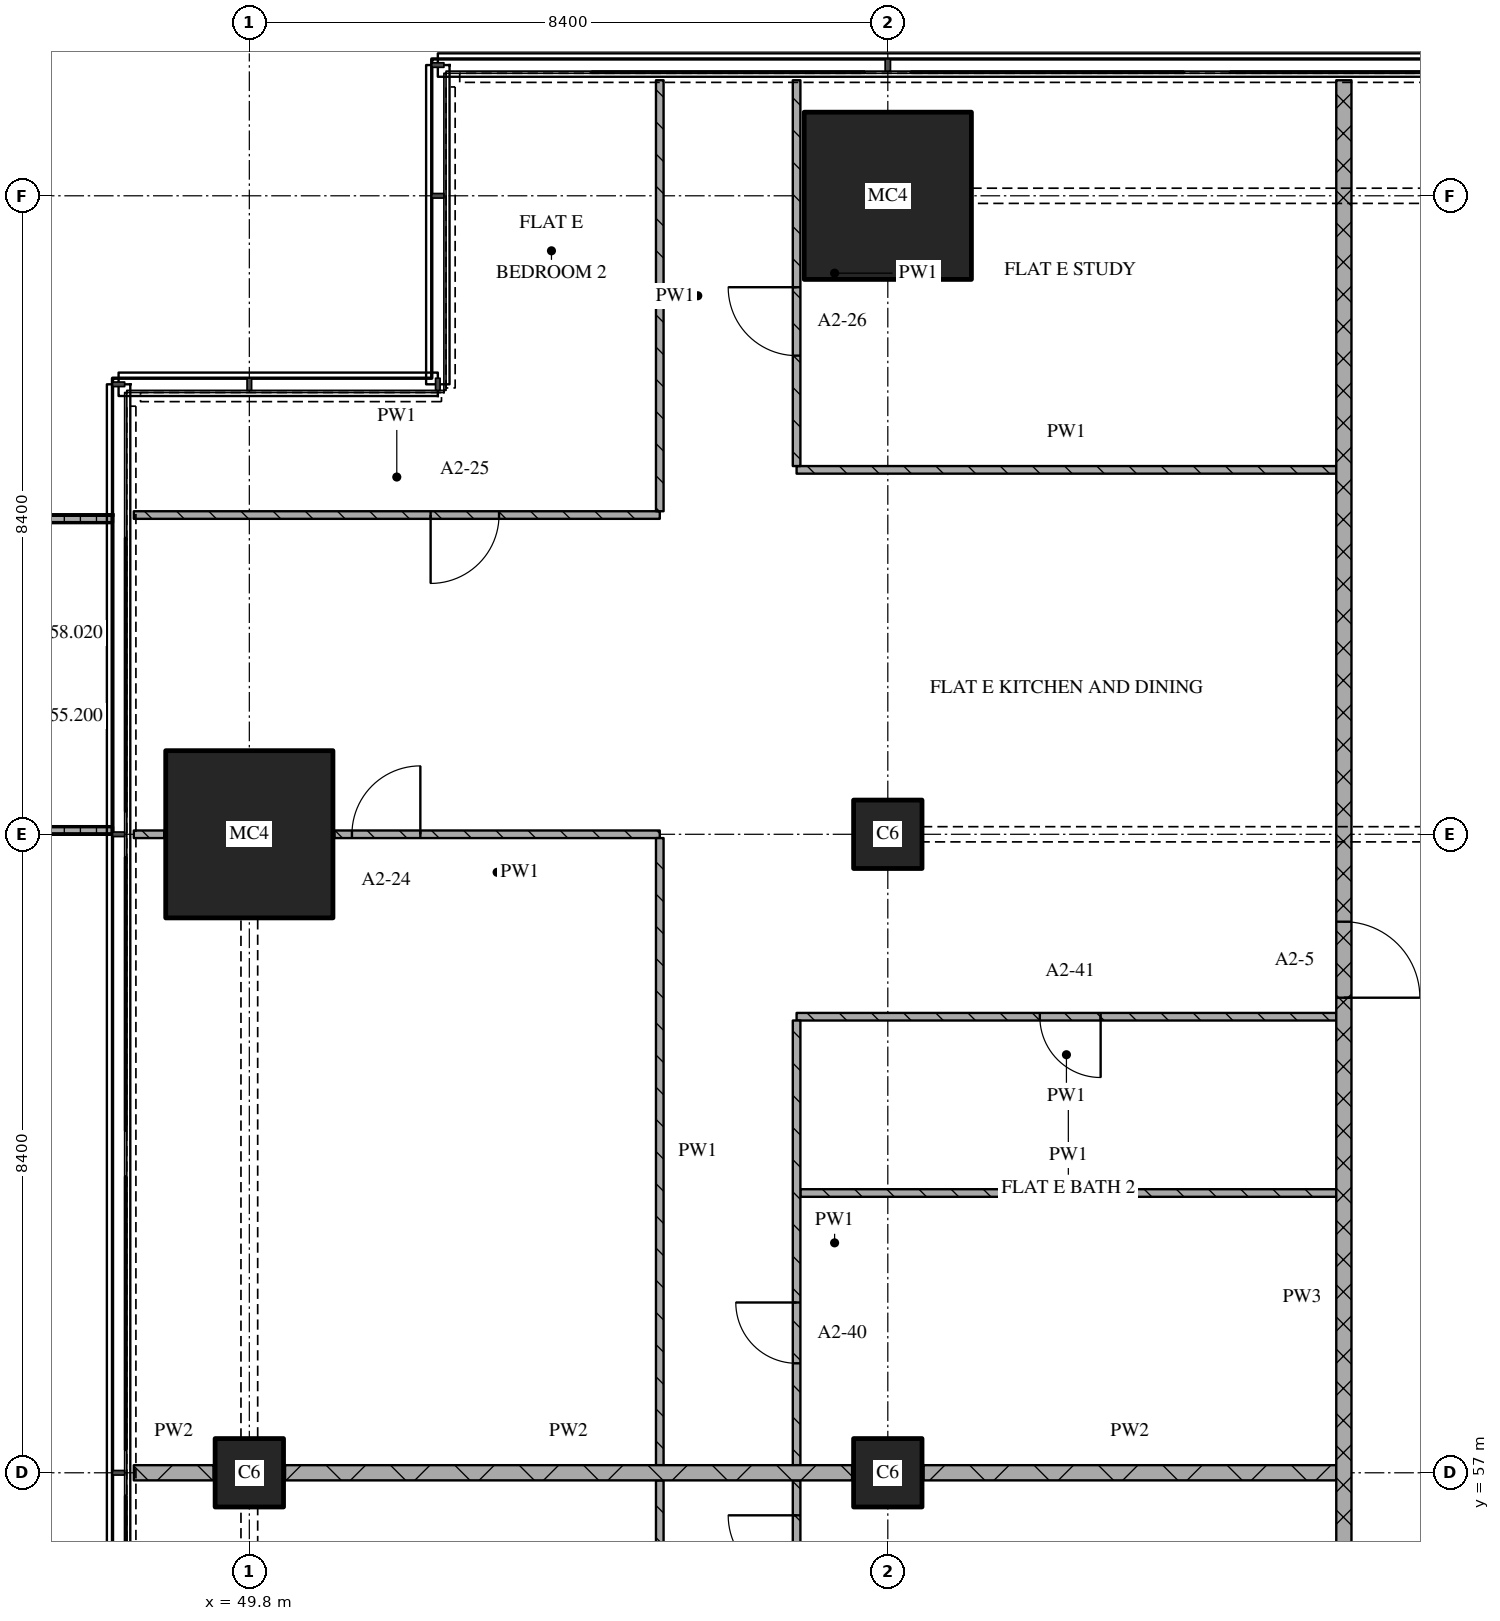
"""IFC4 building model, lengths in metres.
Left out: names, types, materials, properties, quantities, classifications, styles, units other than length and angle.
Written with IfcOpenShell. Run it as: python <this file> out.ifc"""

import sys

from ifc_helpers import new_model, si_unit, direction, frame, frame_2d, origin, origin_2d, place, context, subcontext, project, spatial, polyline, rectangle, outline, extrude, element, fill, save


model = new_model("IFC4")
c1 = context("Model", 3, precision=1e-05, world=origin(), true_north=direction((0.0, 1.0)))
c2 = subcontext(c1, "Body", "Model", "MODEL_VIEW")
j1 = project(units=[si_unit("LENGTHUNIT", "METRE"), si_unit("PLANEANGLEUNIT", "RADIAN")], contexts=[c1])
p1 = place(None, origin())
s1 = spatial("IfcSite", under=j1, at=p1, CompositionType="ELEMENT")
p2 = place(p1, origin())
s2 = spatial("IfcBuilding", under=s1, at=p2, CompositionType="ELEMENT")
p3 = place(p2, frame((0.0, 0.0, 55.2)))
s3 = spatial("IfcBuildingStorey", under=s2, at=p3, CompositionType="ELEMENT", Elevation=55.2)
p4 = place(p3, frame((49.8, 57.0, 0.0), z_axis=(0.0, 0.0, 1.0), x_axis=(1.0, 0.0, 0.0)))
e1 = element("IfcColumn", 1, at=p4, inside=s3, PredefinedType="COLUMN", context=c2, shape_type="SweptSolid", body=[
    extrude(rectangle(XDim=0.9, YDim=0.9, at=origin_2d()), origin(), (0.0, 0.0, 1.0), 3.6),
])
p5 = place(p3, frame((49.8, 65.4, 0.0), z_axis=(0.0, 0.0, 1.0), x_axis=(1.0, 0.0, 0.0)))
e2 = element("IfcColumn", 2, at=p5, inside=s3, PredefinedType="COLUMN", context=c2, shape_type="SweptSolid", body=[
    extrude(rectangle(XDim=2.2, YDim=2.2, at=origin_2d()), origin(), (0.0, 0.0, 1.0), 3.6),
])
for number, where, z_axis, x_axis in (
    (3, (58.2, 57.0, 0.0), (0.0, 0.0, 1.0), (1.0, 0.0, 0.0)),
    (4, (58.2, 65.4, 0.0), (0.0, 0.0, 1.0), (1.0, 0.0, 0.0)),
):
    element("IfcColumn", number, at=place(p3, frame(where, z_axis=z_axis, x_axis=x_axis)), inside=s3, PredefinedType="COLUMN", context=c2, shape_type="SweptSolid", body=[
        extrude(rectangle(XDim=0.9, YDim=0.9, at=origin_2d()), origin(), (0.0, 0.0, 1.0), 3.6),
    ])
p6 = place(p3, frame((58.2, 73.8, 0.0), z_axis=(0.0, 0.0, 1.0), x_axis=(1.0, 0.0, 0.0)))
e5 = element("IfcColumn", 5, at=p6, inside=s3, PredefinedType="COLUMN", context=c2, shape_type="SweptSolid", body=[
    extrude(rectangle(XDim=2.2, YDim=2.2, at=origin_2d()), origin(), (0.0, 0.0, 1.0), 3.6),
])
p7 = place(p3, origin())
e6 = element("IfcWall", 6, at=p7, inside=s3, PredefinedType="SOLIDWALL", context=c2, shape_type="SweptSolid", body=[
    extrude(outline(polyline([(48.0, 69.6), (48.0, 69.5), (46.367, 69.5), (46.367, 65.5), (48.0, 65.5), (48.0, 65.4), (46.267, 65.4), (46.267, 69.6), (48.0, 69.6)])), origin(), (0.0, 0.0, 1.0), 1.0),
])
p8 = place(p3, frame((48.28, 57.0, 0.0), z_axis=(0.0, 0.0, 1.0), x_axis=(1.0, 0.0, 0.0)))
e7 = element("IfcWall", 7, at=p8, inside=s3, PredefinedType="PARTITIONING", context=c2, shape_type="SweptSolid", body=[
    extrude(rectangle(XDim=1.05, YDim=0.2, at=frame_2d((0.525, 0.0))), origin(), (0.0, 0.0, 1.0), 3.32),
])
p9 = place(p3, frame((50.27, 57.0, 0.0), z_axis=(0.0, 0.0, 1.0), x_axis=(1.0, 0.0, 0.0)))
e8 = element("IfcWall", 8, at=p9, inside=s3, PredefinedType="PARTITIONING", context=c2, shape_type="SweptSolid", body=[
    extrude(rectangle(XDim=7.46, YDim=0.2, at=frame_2d((3.73, 0.0))), origin(), (0.0, 0.0, 1.0), 3.32),
])
p10 = place(p3, frame((58.67, 57.0, 0.0), z_axis=(0.0, 0.0, 1.0), x_axis=(1.0, 0.0, 0.0)))
e9 = element("IfcWall", 9, at=p10, inside=s3, PredefinedType="PARTITIONING", context=c2, shape_type="SweptSolid", body=[
    extrude(rectangle(XDim=5.43, YDim=0.2, at=frame_2d((2.715, 0.0))), origin(), (0.0, 0.0, 1.0), 3.32),
])
p11 = place(p3, frame((57.05, 60.681, 0.0), z_axis=(0.0, 0.0, 1.0), x_axis=(1.0, 0.0, 0.0)))
e10 = element("IfcWall", 10, at=p11, inside=s3, PredefinedType="PARTITIONING", context=c2, shape_type="SweptSolid", body=[
    extrude(rectangle(XDim=7.05, YDim=0.1, at=frame_2d((3.525, 0.0))), origin(), (0.0, 0.0, 1.0), 3.32),
])
p12 = place(p3, frame((64.1, 63.0, 0.0), z_axis=(0.0, 0.0, 1.0), x_axis=(-1.0, 0.0, 0.0)))
e11 = element("IfcWall", 11, at=p12, inside=s3, PredefinedType="PARTITIONING", context=c2, shape_type="SweptSolid", body=[
    extrude(rectangle(XDim=7.1, YDim=0.1, at=frame_2d((3.55, 0.0))), origin(), (0.0, 0.0, 1.0), 3.32),
])
p13 = place(p12, frame((3.1, 0.0, 0.0)))
e12 = element("IfcOpeningElement", 12, at=p13, cuts=e11, PredefinedType="OPENING", context=c2, shape_type="SweptSolid", body=[
    extrude(rectangle(XDim=0.8, YDim=2.1, at=frame_2d((0.4, 1.05))), frame((0.0, 0.06, 0.0), z_axis=(0.0, -1.0, 0.0), x_axis=(1.0, 0.0, 0.0)), (0.0, 0.0, 1.0), 0.12),
])
p14 = place(p3, frame((48.28, 65.4, 0.0), z_axis=(0.0, 0.0, 1.0), x_axis=(1.0, 0.0, 0.0)))
e13 = element("IfcWall", 13, at=p14, inside=s3, PredefinedType="PARTITIONING", context=c2, shape_type="SweptSolid", body=[
    extrude(rectangle(XDim=0.4, YDim=0.1, at=frame_2d((0.2, 0.0))), origin(), (0.0, 0.0, 1.0), 3.32),
])
p15 = place(p3, frame((55.2, 65.4, 0.0), z_axis=(0.0, 0.0, 1.0), x_axis=(-1.0, 0.0, 0.0)))
e14 = element("IfcWall", 14, at=p15, inside=s3, PredefinedType="PARTITIONING", context=c2, shape_type="SweptSolid", body=[
    extrude(rectangle(XDim=4.28, YDim=0.1, at=frame_2d((2.14, 0.0))), origin(), (0.0, 0.0, 1.0), 3.32),
])
p16 = place(p15, frame((3.15, 0.0, 0.0)))
e15 = element("IfcOpeningElement", 15, at=p16, cuts=e14, PredefinedType="OPENING", context=c2, shape_type="SweptSolid", body=[
    extrude(rectangle(XDim=0.9, YDim=2.1, at=frame_2d((0.45, 1.05))), frame((0.0, 0.06, 0.0), z_axis=(0.0, -1.0, 0.0), x_axis=(1.0, 0.0, 0.0)), (0.0, 0.0, 1.0), 0.12),
])
p17 = place(p3, frame((48.28, 69.6, 0.0), z_axis=(0.0, 0.0, 1.0), x_axis=(1.0, 0.0, 0.0)))
e16 = element("IfcWall", 16, at=p17, inside=s3, PredefinedType="PARTITIONING", context=c2, shape_type="SweptSolid", body=[
    extrude(rectangle(XDim=6.92, YDim=0.1, at=frame_2d((3.46, 0.0))), origin(), (0.0, 0.0, 1.0), 3.32),
])
p18 = place(p17, frame((3.905, 0.0, 0.0)))
e17 = element("IfcOpeningElement", 17, at=p18, cuts=e16, PredefinedType="OPENING", context=c2, shape_type="SweptSolid", body=[
    extrude(rectangle(XDim=0.9, YDim=2.1, at=frame_2d((0.45, 1.05))), frame((0.0, 0.06, 0.0), z_axis=(0.0, -1.0, 0.0), x_axis=(1.0, 0.0, 0.0)), (0.0, 0.0, 1.0), 0.12),
])
p19 = place(p3, frame((57.0, 70.194, 0.0), z_axis=(0.0, 0.0, 1.0), x_axis=(1.0, 0.0, 0.0)))
e18 = element("IfcWall", 18, at=p19, inside=s3, PredefinedType="PARTITIONING", context=c2, shape_type="SweptSolid", body=[
    extrude(rectangle(XDim=7.1, YDim=0.1, at=frame_2d((3.55, 0.0))), origin(), (0.0, 0.0, 1.0), 3.32),
])
p20 = place(p3, frame((55.2, 75.32, 0.0), z_axis=(0.0, 0.0, 1.0), x_axis=(0.0, -1.0, 0.0)))
e19 = element("IfcWall", 19, at=p20, inside=s3, PredefinedType="PARTITIONING", context=c2, shape_type="SweptSolid", body=[
    extrude(rectangle(XDim=5.67, YDim=0.1, at=frame_2d((2.835, 0.0))), origin(), (0.0, 0.0, 1.0), 3.32),
])
p21 = place(p3, frame((57.0, 75.32, 0.0), z_axis=(0.0, 0.0, 1.0), x_axis=(0.0, -1.0, 0.0)))
e20 = element("IfcWall", 20, at=p21, inside=s3, PredefinedType="PARTITIONING", context=c2, shape_type="SweptSolid", body=[
    extrude(rectangle(XDim=5.076, YDim=0.1, at=frame_2d((2.538, 0.0))), origin(), (0.0, 0.0, 1.0), 3.32),
])
p22 = place(p21, frame((2.723, 0.0, 0.0)))
e21 = element("IfcOpeningElement", 21, at=p22, cuts=e20, PredefinedType="OPENING", context=c2, shape_type="SweptSolid", body=[
    extrude(rectangle(XDim=0.9, YDim=2.1, at=frame_2d((0.45, 1.05))), frame((0.0, 0.06, 0.0), z_axis=(0.0, -1.0, 0.0), x_axis=(1.0, 0.0, 0.0)), (0.0, 0.0, 1.0), 0.12),
])
p23 = place(p3, frame((64.2, 43.3, 0.0), z_axis=(0.0, 0.0, 1.0), x_axis=(0.0, 1.0, 0.0)))
e22 = element("IfcWall", 22, at=p23, inside=s3, PredefinedType="PARTITIONING", context=c2, shape_type="SweptSolid", body=[
    extrude(rectangle(XDim=32.02, YDim=0.2, at=frame_2d((16.01, 0.0))), origin(), (0.0, 0.0, 1.0), 3.32),
])
p24 = place(p23, frame((19.95, 0.0, 0.0)))
e23 = element("IfcOpeningElement", 23, at=p24, cuts=e22, PredefinedType="OPENING", context=c2, shape_type="SweptSolid", body=[
    extrude(rectangle(XDim=1.0, YDim=2.1, at=frame_2d((0.5, 1.05))), frame((0.0, 0.11, 0.0), z_axis=(0.0, -1.0, 0.0), x_axis=(1.0, 0.0, 0.0)), (0.0, 0.0, 1.0), 0.22),
])
for number, where, z_axis, x_axis in (
    (24, (55.2, 56.9, 0.0), (0.0, 0.0, 1.0), (0.0, -1.0, 0.0)),
    (25, (55.2, 65.35, 0.0), (0.0, 0.0, 1.0), (0.0, -1.0, 0.0)),
):
    element("IfcWall", number, at=place(p3, frame(where, z_axis=z_axis, x_axis=x_axis)), inside=s3, PredefinedType="PARTITIONING", context=c2, shape_type="SweptSolid", body=[
        extrude(rectangle(XDim=8.25, YDim=0.1, at=frame_2d((4.125, 0.0))), origin(), (0.0, 0.0, 1.0), 3.32),
    ])
p25 = place(p3, frame((57.0, 56.9, 0.0), z_axis=(0.0, 0.0, 1.0), x_axis=(0.0, -1.0, 0.0)))
e26 = element("IfcWall", 26, at=p25, inside=s3, PredefinedType="PARTITIONING", context=c2, shape_type="SweptSolid", body=[
    extrude(rectangle(XDim=5.25, YDim=0.1, at=frame_2d((2.625, 0.0))), origin(), (0.0, 0.0, 1.0), 3.32),
])
p26 = place(p25, frame((0.46, 0.0, 0.0)))
e27 = element("IfcOpeningElement", 27, at=p26, cuts=e26, PredefinedType="OPENING", context=c2, shape_type="SweptSolid", body=[
    extrude(rectangle(XDim=0.9, YDim=2.1, at=frame_2d((0.45, 1.05))), frame((0.0, 0.06, 0.0), z_axis=(0.0, -1.0, 0.0), x_axis=(1.0, 0.0, 0.0)), (0.0, 0.0, 1.0), 0.12),
])
p27 = place(p3, frame((57.0, 62.95, 0.0), z_axis=(0.0, 0.0, 1.0), x_axis=(0.0, -1.0, 0.0)))
e28 = element("IfcWall", 28, at=p27, inside=s3, PredefinedType="PARTITIONING", context=c2, shape_type="SweptSolid", body=[
    extrude(rectangle(XDim=5.85, YDim=0.1, at=frame_2d((2.925, 0.0))), origin(), (0.0, 0.0, 1.0), 3.32),
])
p28 = place(p27, frame((3.71, 0.0, 0.0)))
e29 = element("IfcOpeningElement", 29, at=p28, cuts=e28, PredefinedType="OPENING", context=c2, shape_type="SweptSolid", body=[
    extrude(rectangle(XDim=0.8, YDim=2.1, at=frame_2d((0.4, 1.05))), frame((0.0, 0.06, 0.0), z_axis=(0.0, -1.0, 0.0), x_axis=(1.0, 0.0, 0.0)), (0.0, 0.0, 1.0), 0.12),
])
p29 = place(p13, origin())
e30 = element("IfcDoor", 30, at=p29, inside=s3, OperationType="SINGLE_SWING_LEFT", PredefinedType="DOOR", context=c2, shape_type="SweptSolid", body=[
    extrude(rectangle(XDim=0.8, YDim=2.1, at=frame_2d((0.4, 1.05))), frame((0.0, 0.025, 0.0), z_axis=(0.0, -1.0, 0.0), x_axis=(1.0, 0.0, 0.0)), (0.0, 0.0, 1.0), 0.05),
])
fill(e12, e30)
p30 = place(p16, origin())
e31 = element("IfcDoor", 31, at=p30, inside=s3, OperationType="SINGLE_SWING_RIGHT", PredefinedType="DOOR", context=c2, shape_type="SweptSolid", body=[
    extrude(rectangle(XDim=0.9, YDim=2.1, at=frame_2d((0.45, 1.05))), frame((0.0, 0.025, 0.0), z_axis=(0.0, -1.0, 0.0), x_axis=(1.0, 0.0, 0.0)), (0.0, 0.0, 1.0), 0.05),
])
fill(e15, e31)
p31 = place(p18, origin())
e32 = element("IfcDoor", 32, at=p31, inside=s3, OperationType="SINGLE_SWING_RIGHT", PredefinedType="DOOR", context=c2, shape_type="SweptSolid", body=[
    extrude(rectangle(XDim=0.9, YDim=2.1, at=frame_2d((0.45, 1.05))), frame((0.0, 0.025, 0.0), z_axis=(0.0, -1.0, 0.0), x_axis=(1.0, 0.0, 0.0)), (0.0, 0.0, 1.0), 0.05),
])
fill(e17, e32)
p32 = place(p22, origin())
e33 = element("IfcDoor", 33, at=p32, inside=s3, OperationType="SINGLE_SWING_RIGHT", PredefinedType="DOOR", context=c2, shape_type="SweptSolid", body=[
    extrude(rectangle(XDim=0.9, YDim=2.1, at=frame_2d((0.45, 1.05))), frame((0.0, 0.025, 0.0), z_axis=(0.0, -1.0, 0.0), x_axis=(1.0, 0.0, 0.0)), (0.0, 0.0, 1.0), 0.05),
])
fill(e21, e33)
p33 = place(p24, origin())
e34 = element("IfcDoor", 34, at=p33, inside=s3, OperationType="SINGLE_SWING_RIGHT", PredefinedType="DOOR", context=c2, shape_type="SweptSolid", body=[
    extrude(rectangle(XDim=1.0, YDim=2.1, at=frame_2d((0.5, 1.05))), frame((0.0, 0.025, 0.0), z_axis=(0.0, -1.0, 0.0), x_axis=(1.0, 0.0, 0.0)), (0.0, 0.0, 1.0), 0.05),
])
fill(e23, e34)
p34 = place(p26, origin())
e35 = element("IfcDoor", 35, at=p34, inside=s3, OperationType="SINGLE_SWING_RIGHT", PredefinedType="DOOR", context=c2, shape_type="SweptSolid", body=[
    extrude(rectangle(XDim=0.9, YDim=2.1, at=frame_2d((0.45, 1.05))), frame((0.0, 0.025, 0.0), z_axis=(0.0, -1.0, 0.0), x_axis=(1.0, 0.0, 0.0)), (0.0, 0.0, 1.0), 0.05),
])
fill(e27, e35)
p35 = place(p28, origin())
e36 = element("IfcDoor", 36, at=p35, inside=s3, OperationType="SINGLE_SWING_RIGHT", PredefinedType="DOOR", context=c2, shape_type="SweptSolid", body=[
    extrude(rectangle(XDim=0.8, YDim=2.1, at=frame_2d((0.4, 1.05))), frame((0.0, 0.025, 0.0), z_axis=(0.0, -1.0, 0.0), x_axis=(1.0, 0.0, 0.0)), (0.0, 0.0, 1.0), 0.05),
])
fill(e29, e36)
save(model, sys.argv[1])
